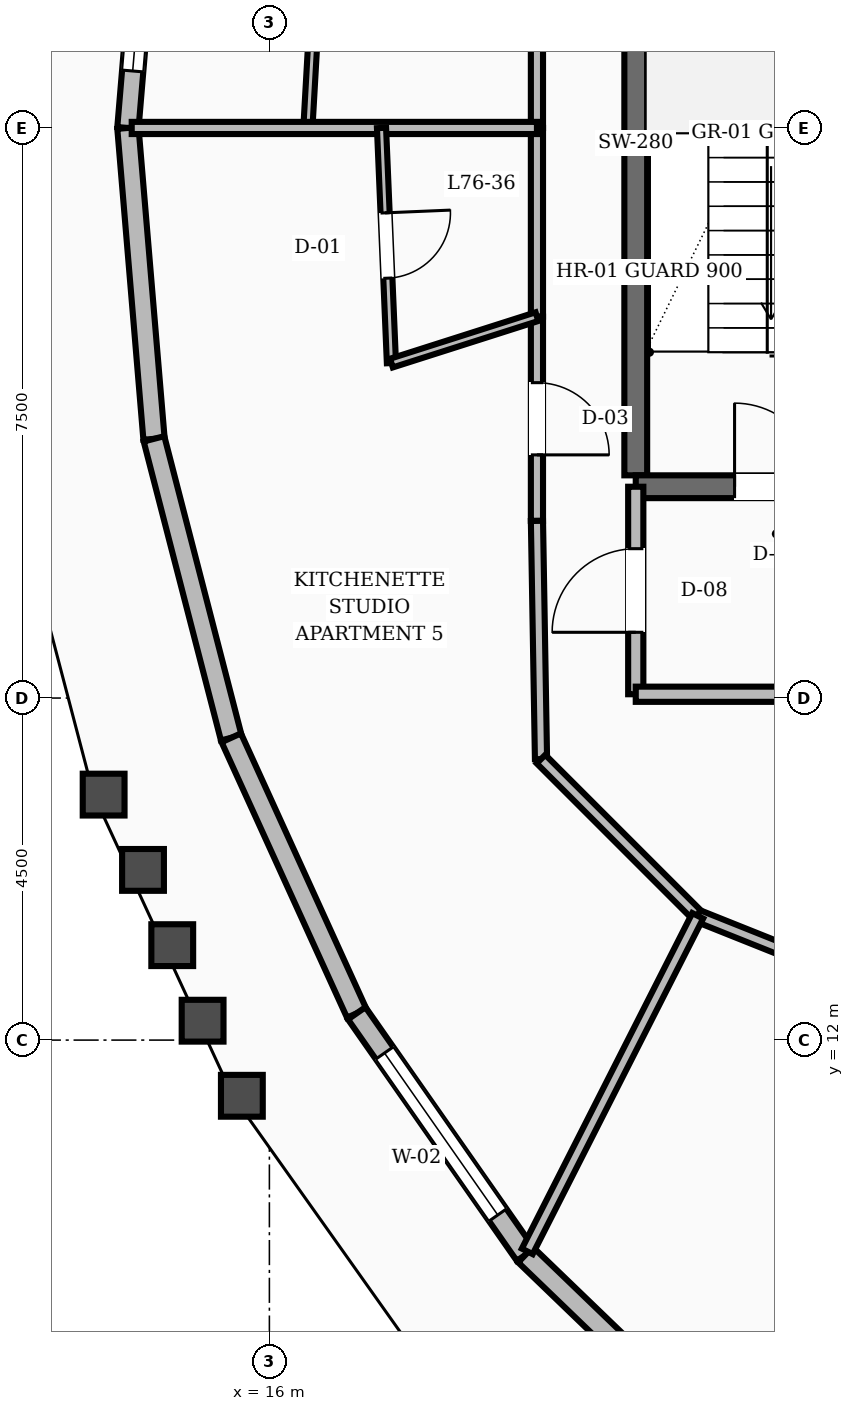
"""IFC4 building model, lengths in metres.
Left out: names, types, materials, properties, quantities, classifications, styles, units other than length and angle.
Written with IfcOpenShell. Run it as: python <this file> out.ifc"""

import sys

from ifc_helpers import new_model, si_unit, direction, frame, frame_2d, origin, place, context, subcontext, project, spatial, rectangle, extrude, element, fill, save


model = new_model("IFC4")
c1 = context("Model", 3, precision=1e-05, world=origin(), true_north=direction((0.0, 1.0)))
c2 = subcontext(c1, "Body", "Model", "MODEL_VIEW")
j1 = project(units=[si_unit("LENGTHUNIT", "METRE"), si_unit("PLANEANGLEUNIT", "RADIAN")], contexts=[c1])
p1 = place(None, origin())
s1 = spatial("IfcSite", under=j1, at=p1, CompositionType="ELEMENT")
p2 = place(p1, origin())
s2 = spatial("IfcBuilding", under=s1, at=p2, CompositionType="ELEMENT")
p3 = place(p2, frame((0.0, 0.0, 290.4)))
s3 = spatial("IfcBuildingStorey", under=s2, at=p3, CompositionType="ELEMENT", Elevation=290.4)
p4 = place(p3, frame((20.82, 19.43, 0.0), z_axis=(0.0, 0.0, 1.0), x_axis=(0.0, 1.0, 0.0)))
e1 = element("IfcWall", 1, at=p4, inside=s3, PredefinedType="SHEAR", context=c2, shape_type="SweptSolid", body=[
    extrude(rectangle(XDim=8.74, YDim=0.3, at=frame_2d((4.37, 0.0))), origin(), (0.0, 0.0, 1.0), 3.6),
])
p5 = place(p3, frame((20.82, 19.28, 0.0), z_axis=(0.0, 0.0, 1.0), x_axis=(1.0, 0.0, 0.0)))
e2 = element("IfcWall", 2, at=p5, inside=s3, PredefinedType="SHEAR", context=c2, shape_type="SweptSolid", body=[
    extrude(rectangle(XDim=3.6, YDim=0.3, at=frame_2d((1.8, 0.0))), origin(), (0.0, 0.0, 1.0), 3.6),
])
p6 = place(p5, frame((1.3, 0.0, 0.0)))
e3 = element("IfcOpeningElement", 3, at=p6, cuts=e2, PredefinedType="OPENING", context=c2, shape_type="SweptSolid", body=[
    extrude(rectangle(XDim=1.1, YDim=2.1, at=frame_2d((0.55, 1.05))), frame((0.0, 0.16, 0.0), z_axis=(0.0, -1.0, 0.0), x_axis=(1.0, 0.0, 0.0)), (0.0, 0.0, 1.0), 0.32),
])
p7 = place(p3, frame((14.482, 28.09, 0.0), z_axis=(0.0, 0.0, 1.0), x_axis=(-0.083636215003, -0.996496354002, 0.0)))
e4 = element("IfcWall", 4, at=p7, inside=s3, PredefinedType="STANDARD", context=c2, shape_type="SweptSolid", body=[
    extrude(rectangle(XDim=4.104, YDim=0.28, at=frame_2d((2.052, 0.0))), origin(), (0.0, 0.0, 1.0), 2.88),
])
p8 = place(p7, frame((0.752, 0.0, 0.8)))
e5 = element("IfcOpeningElement", 5, at=p8, cuts=e4, PredefinedType="OPENING", context=c2, shape_type="SweptSolid", body=[
    extrude(rectangle(XDim=2.6, YDim=1.65, at=frame_2d((1.3, 0.825))), frame((0.0, 0.15, 0.0), z_axis=(0.0, -1.0, 0.0), x_axis=(1.0, 0.0, 0.0)), (0.0, 0.0, 1.0), 0.3),
])
p9 = place(p3, frame((14.139, 24.0, 0.0), z_axis=(0.0, 0.0, 1.0), x_axis=(0.083636215003, -0.996496354002, 0.0)))
e6 = element("IfcWall", 6, at=p9, inside=s3, PredefinedType="STANDARD", context=c2, shape_type="SweptSolid", body=[
    extrude(rectangle(XDim=4.104, YDim=0.28, at=frame_2d((2.052, 0.0))), origin(), (0.0, 0.0, 1.0), 2.88),
])
p10 = place(p3, frame((14.482, 19.91, 0.0), z_axis=(0.0, 0.0, 1.0), x_axis=(0.250207014881, -0.968192361932, 0.0)))
e7 = element("IfcWall", 7, at=p10, inside=s3, PredefinedType="STANDARD", context=c2, shape_type="SweptSolid", body=[
    extrude(rectangle(XDim=4.062, YDim=0.28, at=frame_2d((2.031, 0.0))), origin(), (0.0, 0.0, 1.0), 2.88),
])
p11 = place(p3, frame((15.498, 15.977, 0.0), z_axis=(0.0, 0.0, 1.0), x_axis=(0.414454053433, -0.910070237725, 0.0)))
e8 = element("IfcWall", 8, at=p11, inside=s3, PredefinedType="STANDARD", context=c2, shape_type="SweptSolid", body=[
    extrude(rectangle(XDim=3.983, YDim=0.28, at=frame_2d((1.991, 0.0))), origin(), (0.0, 0.0, 1.0), 2.88),
])
p12 = place(p3, frame((17.149, 12.353, 0.0), z_axis=(0.0, 0.0, 1.0), x_axis=(0.573022646369, -0.819539533365, 0.0)))
e9 = element("IfcWall", 9, at=p12, inside=s3, PredefinedType="STANDARD", context=c2, shape_type="SweptSolid", body=[
    extrude(rectangle(XDim=3.876, YDim=0.28, at=frame_2d((1.938, 0.0))), origin(), (0.0, 0.0, 1.0), 2.88),
])
p13 = place(p12, frame((0.638, 0.0, 0.8)))
e10 = element("IfcOpeningElement", 10, at=p13, cuts=e9, PredefinedType="OPENING", context=c2, shape_type="SweptSolid", body=[
    extrude(rectangle(XDim=2.6, YDim=1.65, at=frame_2d((1.3, 0.825))), frame((0.0, 0.15, 0.0), z_axis=(0.0, -1.0, 0.0), x_axis=(1.0, 0.0, 0.0)), (0.0, 0.0, 1.0), 0.3),
])
p14 = place(p3, frame((19.37, 9.176, 0.0), z_axis=(0.0, 0.0, 1.0), x_axis=(0.720234855693, -0.693730316943, 0.0)))
e11 = element("IfcWall", 11, at=p14, inside=s3, PredefinedType="STANDARD", context=c2, shape_type="SweptSolid", body=[
    extrude(rectangle(XDim=3.758, YDim=0.28, at=frame_2d((1.879, 0.0))), origin(), (0.0, 0.0, 1.0), 2.88),
])
p15 = place(p3, frame((20.82, 16.55, 0.0), z_axis=(0.0, 0.0, 1.0), x_axis=(0.0, 1.0, 0.0)))
e12 = element("IfcWall", 12, at=p15, inside=s3, PredefinedType="SOLIDWALL", context=c2, shape_type="SweptSolid", body=[
    extrude(rectangle(XDim=2.73, YDim=0.2, at=frame_2d((1.365, 0.0))), origin(), (0.0, 0.0, 1.0), 2.87),
])
p16 = place(p15, frame((0.815, 0.0, 0.0)))
e13 = element("IfcOpeningElement", 13, at=p16, cuts=e12, PredefinedType="OPENING", context=c2, shape_type="SweptSolid", body=[
    extrude(rectangle(XDim=1.1, YDim=2.1, at=frame_2d((0.55, 1.05))), frame((0.0, 0.11, 0.0), z_axis=(0.0, -1.0, 0.0), x_axis=(1.0, 0.0, 0.0)), (0.0, 0.0, 1.0), 0.22),
])
p17 = place(p3, frame((20.82, 16.55, 0.0), z_axis=(0.0, 0.0, 1.0), x_axis=(1.0, 0.0, 0.0)))
e14 = element("IfcWall", 14, at=p17, inside=s3, PredefinedType="SOLIDWALL", context=c2, shape_type="SweptSolid", body=[
    extrude(rectangle(XDim=3.98, YDim=0.2, at=frame_2d((1.99, 0.0))), origin(), (0.0, 0.0, 1.0), 2.87),
])
for number, where, z_axis, x_axis in (
    (15, (19.52, 26.482, 0.0), (0.0, 0.0, 1.0), (0.0, -1.0, 0.0)),
    (16, (19.52, 24.0, 0.0), (0.0, 0.0, 1.0), (0.0, -1.0, 0.0)),
):
    element("IfcWall", number, at=place(p3, frame(where, z_axis=z_axis, x_axis=x_axis)), inside=s3, PredefinedType="SOLIDWALL", context=c2, shape_type="SweptSolid", body=[
        extrude(rectangle(XDim=2.482, YDim=0.16, at=frame_2d((1.241, 0.0))), origin(), (0.0, 0.0, 1.0), 2.87),
    ])
p18 = place(p3, frame((19.52, 21.518, 0.0), z_axis=(0.0, 0.0, 1.0), x_axis=(0.0, -1.0, 0.0)))
e17 = element("IfcWall", 17, at=p18, inside=s3, PredefinedType="SOLIDWALL", context=c2, shape_type="SweptSolid", body=[
    extrude(rectangle(XDim=2.687, YDim=0.16, at=frame_2d((1.344, 0.0))), origin(), (0.0, 0.0, 1.0), 2.87),
])
p19 = place(p18, frame((0.868, 0.0, 0.0)))
e18 = element("IfcOpeningElement", 18, at=p19, cuts=e17, PredefinedType="OPENING", context=c2, shape_type="SweptSolid", body=[
    extrude(rectangle(XDim=0.95, YDim=2.1, at=frame_2d((0.475, 1.05))), frame((0.0, 0.09, 0.0), z_axis=(0.0, -1.0, 0.0), x_axis=(1.0, 0.0, 0.0)), (0.0, 0.0, 1.0), 0.18),
])
p20 = place(p3, frame((19.52, 18.831, 0.0), z_axis=(0.0, 0.0, 1.0), x_axis=(0.016981035134, -0.999855811828, 0.0)))
e19 = element("IfcWall", 19, at=p20, inside=s3, PredefinedType="SOLIDWALL", context=c2, shape_type="SweptSolid", body=[
    extrude(rectangle(XDim=3.134, YDim=0.16, at=frame_2d((1.567, 0.0))), origin(), (0.0, 0.0, 1.0), 2.87),
])
p21 = place(p3, frame((19.573, 15.697, 0.0), z_axis=(0.0, 0.0, 1.0), x_axis=(0.707106781187, -0.707106781187, 0.0)))
e20 = element("IfcWall", 20, at=p21, inside=s3, PredefinedType="SOLIDWALL", context=c2, shape_type="SweptSolid", body=[
    extrude(rectangle(XDim=2.916, YDim=0.16, at=frame_2d((1.458, 0.0))), origin(), (0.0, 0.0, 1.0), 2.87),
])
p22 = place(p3, frame((21.635, 13.635, 0.0), z_axis=(0.0, 0.0, 1.0), x_axis=(0.92856882165, -0.371160266542, 0.0)))
e21 = element("IfcWall", 21, at=p22, inside=s3, PredefinedType="SOLIDWALL", context=c2, shape_type="SweptSolid", body=[
    extrude(rectangle(XDim=2.923, YDim=0.16, at=frame_2d((1.461, 0.0))), origin(), (0.0, 0.0, 1.0), 2.87),
])
p23 = place(p3, frame((16.699, 27.383, 0.0), z_axis=(0.0, 0.0, 1.0), x_axis=(-0.056711181709, -0.998390625892, 0.0)))
e22 = element("IfcWall", 22, at=p23, inside=s3, PredefinedType="PARTITIONING", context=c2, shape_type="SweptSolid", body=[
    extrude(rectangle(XDim=3.388, YDim=0.12, at=frame_2d((1.694, 0.0))), origin(), (0.0, 0.0, 1.0), 2.87),
])
p24 = place(p23, frame((1.219, 0.0, 0.0)))
e23 = element("IfcOpeningElement", 23, at=p24, cuts=e22, PredefinedType="OPENING", context=c2, shape_type="SweptSolid", body=[
    extrude(rectangle(XDim=0.95, YDim=2.1, at=frame_2d((0.475, 1.05))), frame((0.0, 0.07, 0.0), z_axis=(0.0, -1.0, 0.0), x_axis=(1.0, 0.0, 0.0)), (0.0, 0.0, 1.0), 0.14),
])
p25 = place(p3, frame((19.52, 24.0, 0.0), z_axis=(0.0, 0.0, 1.0), x_axis=(-1.0, 0.0, 0.0)))
e24 = element("IfcWall", 24, at=p25, inside=s3, PredefinedType="SOLIDWALL", context=c2, shape_type="SweptSolid", body=[
    extrude(rectangle(XDim=5.331, YDim=0.16, at=frame_2d((2.666, 0.0))), origin(), (0.0, 0.0, 1.0), 2.87),
])
p26 = place(p3, frame((17.475, 24.0, 0.0), z_axis=(0.0, 0.0, 1.0), x_axis=(0.042109419469, -0.999113005016, 0.0)))
e25 = element("IfcWall", 25, at=p26, inside=s3, PredefinedType="PARTITIONING", context=c2, shape_type="SweptSolid", body=[
    extrude(rectangle(XDim=3.096, YDim=0.12, at=frame_2d((1.548, 0.0))), origin(), (0.0, 0.0, 1.0), 2.87),
])
p27 = place(p26, frame((1.118, 0.0, 0.0)))
e26 = element("IfcOpeningElement", 26, at=p27, cuts=e25, PredefinedType="OPENING", context=c2, shape_type="SweptSolid", body=[
    extrude(rectangle(XDim=0.86, YDim=2.1, at=frame_2d((0.43, 1.05))), frame((0.0, 0.07, 0.0), z_axis=(0.0, -1.0, 0.0), x_axis=(1.0, 0.0, 0.0)), (0.0, 0.0, 1.0), 0.14),
])
p28 = place(p3, frame((19.52, 21.518, 0.0), z_axis=(0.0, 0.0, 1.0), x_axis=(-0.952686159799, -0.303955721986, 0.0)))
e27 = element("IfcWall", 27, at=p28, inside=s3, PredefinedType="PARTITIONING", context=c2, shape_type="SweptSolid", body=[
    extrude(rectangle(XDim=2.01, YDim=0.12, at=frame_2d((1.005, 0.0))), origin(), (0.0, 0.0, 1.0), 2.87),
])
p29 = place(p3, frame((21.635, 13.635, 0.0), z_axis=(0.0, 0.0, 1.0), x_axis=(-0.452865456809, -0.891578868093, 0.0)))
e28 = element("IfcWall", 28, at=p29, inside=s3, PredefinedType="SOLIDWALL", context=c2, shape_type="SweptSolid", body=[
    extrude(rectangle(XDim=4.951, YDim=0.16, at=frame_2d((2.476, 0.0))), origin(), (0.0, 0.0, 1.0), 2.87),
])
p30 = place(p8, origin())
e29 = element("IfcWindow", 29, at=p30, inside=s3, PartitioningType="SINGLE_PANEL", PredefinedType="WINDOW", context=c2, shape_type="SweptSolid", body=[
    extrude(rectangle(XDim=2.6, YDim=1.65, at=frame_2d((1.3, 0.825))), frame((0.0, 0.03, 0.0), z_axis=(0.0, -1.0, 0.0), x_axis=(1.0, 0.0, 0.0)), (0.0, 0.0, 1.0), 0.06),
])
fill(e5, e29)
p31 = place(p13, origin())
e30 = element("IfcWindow", 30, at=p31, inside=s3, PartitioningType="SINGLE_PANEL", PredefinedType="WINDOW", context=c2, shape_type="SweptSolid", body=[
    extrude(rectangle(XDim=2.6, YDim=1.65, at=frame_2d((1.3, 0.825))), frame((0.0, 0.03, 0.0), z_axis=(0.0, -1.0, 0.0), x_axis=(1.0, 0.0, 0.0)), (0.0, 0.0, 1.0), 0.06),
])
fill(e10, e30)
p32 = place(p6, origin())
e31 = element("IfcDoor", 31, at=p32, inside=s3, OperationType="SINGLE_SWING_LEFT", PredefinedType="DOOR", context=c2, shape_type="SweptSolid", body=[
    extrude(rectangle(XDim=1.1, YDim=2.1, at=frame_2d((0.55, 1.05))), frame((0.0, 0.025, 0.0), z_axis=(0.0, -1.0, 0.0), x_axis=(1.0, 0.0, 0.0)), (0.0, 0.0, 1.0), 0.05),
])
fill(e3, e31)
p33 = place(p16, origin())
e32 = element("IfcDoor", 32, at=p33, inside=s3, OperationType="SINGLE_SWING_LEFT", PredefinedType="DOOR", context=c2, shape_type="SweptSolid", body=[
    extrude(rectangle(XDim=1.1, YDim=2.1, at=frame_2d((0.55, 1.05))), frame((0.0, 0.025, 0.0), z_axis=(0.0, -1.0, 0.0), x_axis=(1.0, 0.0, 0.0)), (0.0, 0.0, 1.0), 0.05),
])
fill(e13, e32)
p34 = place(p27, origin())
e33 = element("IfcDoor", 33, at=p34, inside=s3, OperationType="SINGLE_SWING_LEFT", PredefinedType="DOOR", context=c2, shape_type="SweptSolid", body=[
    extrude(rectangle(XDim=0.86, YDim=2.1, at=frame_2d((0.43, 1.05))), frame((0.0, 0.025, 0.0), z_axis=(0.0, -1.0, 0.0), x_axis=(1.0, 0.0, 0.0)), (0.0, 0.0, 1.0), 0.05),
])
fill(e26, e33)
p35 = place(p19, origin())
e34 = element("IfcDoor", 34, at=p35, inside=s3, OperationType="SINGLE_SWING_RIGHT", PredefinedType="DOOR", context=c2, shape_type="SweptSolid", body=[
    extrude(rectangle(XDim=0.95, YDim=2.1, at=frame_2d((0.475, 1.05))), frame((0.0, 0.025, 0.0), z_axis=(0.0, -1.0, 0.0), x_axis=(1.0, 0.0, 0.0)), (0.0, 0.0, 1.0), 0.05),
])
fill(e18, e34)
save(model, sys.argv[1])
